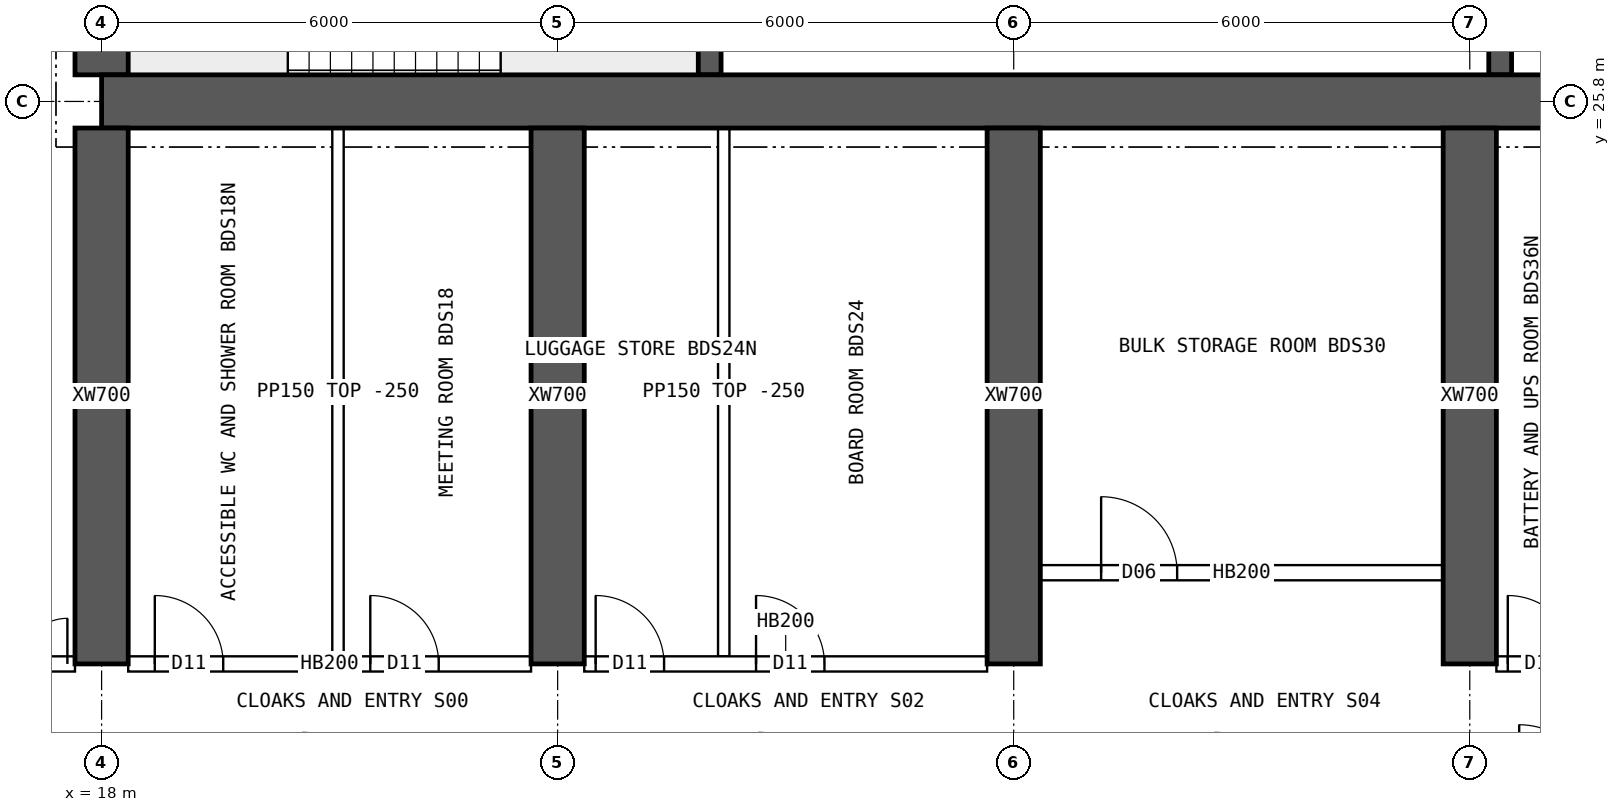
"""IFC4 building model, lengths in metres.
Left out: names, types, materials, properties, quantities, classifications, styles, units other than length and angle.
Written with IfcOpenShell. Run it as: python <this file> out.ifc"""

import sys

from ifc_helpers import new_model, si_unit, direction, frame, frame_2d, origin, place, context, subcontext, project, spatial, rectangle, extrude, element, fill, save


model = new_model("IFC4")
c1 = context("Model", 3, precision=1e-05, world=origin(), true_north=direction((0.0, 1.0)))
c2 = subcontext(c1, "Body", "Model", "MODEL_VIEW")
j1 = project(units=[si_unit("LENGTHUNIT", "METRE"), si_unit("PLANEANGLEUNIT", "RADIAN")], contexts=[c1])
p1 = place(None, origin())
s1 = spatial("IfcSite", under=j1, at=p1, CompositionType="ELEMENT")
p2 = place(p1, origin())
s2 = spatial("IfcBuilding", under=s1, at=p2, CompositionType="ELEMENT")
p3 = place(p2, frame((0.0, 0.0, 250.3)))
s3 = spatial("IfcBuildingStorey", under=s2, at=p3, CompositionType="ELEMENT", Elevation=250.3)
p4 = place(p3, frame((18.0, 25.8, 0.0), z_axis=(0.0, 0.0, 1.0), x_axis=(1.0, 0.0, 0.0)))
e1 = element("IfcWall", 1, at=p4, inside=s3, PredefinedType="SHEAR", context=c2, shape_type="SweptSolid", body=[
    extrude(rectangle(XDim=48.0, YDim=0.7, at=frame_2d((24.0, 0.0))), origin(), (0.0, 0.0, 1.0), 3.75),
])
p5 = place(p3, frame((18.0, 26.15, 0.0), z_axis=(0.0, 0.0, 1.0), x_axis=(0.0, 1.0, 0.0)))
e2 = element("IfcWall", 2, at=p5, inside=s3, PredefinedType="SHEAR", context=c2, shape_type="SweptSolid", body=[
    extrude(rectangle(XDim=11.7, YDim=0.7, at=frame_2d((5.85, 0.0))), origin(), (0.0, 0.0, 1.0), 3.75),
])
p6 = place(p5, frame((5.15, 0.0, 0.0)))
e3 = element("IfcOpeningElement", 3, at=p6, cuts=e2, PredefinedType="OPENING", context=c2, shape_type="SweptSolid", body=[
    extrude(rectangle(XDim=1.2, YDim=2.1, at=frame_2d((0.6, 1.05))), frame((0.0, 0.36, 0.0), z_axis=(0.0, -1.0, 0.0), x_axis=(1.0, 0.0, 0.0)), (0.0, 0.0, 1.0), 0.72),
])
for number, where, z_axis, x_axis in (
    (4, (26.0, 26.15, 0.0), (0.0, 0.0, 1.0), (0.0, 1.0, 0.0)),
    (5, (36.4, 26.15, 0.0), (0.0, 0.0, 1.0), (0.0, 1.0, 0.0)),
):
    element("IfcWall", number, at=place(p3, frame(where, z_axis=z_axis, x_axis=x_axis)), inside=s3, PredefinedType="SHEAR", context=c2, shape_type="SweptSolid", body=[
        extrude(rectangle(XDim=4.1, YDim=0.3, at=frame_2d((2.05, 0.0))), origin(), (0.0, 0.0, 1.0), 3.75),
    ])
for number, where, z_axis, x_axis in (
    (6, (18.0, 18.4, 0.0), (0.0, 0.0, 1.0), (0.0, 1.0, 0.0)),
    (7, (24.0, 18.4, 0.0), (0.0, 0.0, 1.0), (0.0, 1.0, 0.0)),
    (8, (30.0, 18.4, 0.0), (0.0, 0.0, 1.0), (0.0, 1.0, 0.0)),
    (9, (36.0, 18.4, 0.0), (0.0, 0.0, 1.0), (0.0, 1.0, 0.0)),
):
    element("IfcWall", number, at=place(p3, frame(where, z_axis=z_axis, x_axis=x_axis)), inside=s3, PredefinedType="SHEAR", context=c2, shape_type="SweptSolid", body=[
        extrude(rectangle(XDim=7.05, YDim=0.7, at=frame_2d((3.525, 0.0))), origin(), (0.0, 0.0, 1.0), 3.75),
    ])
p7 = place(p3, frame((15.6, 18.4, 0.0), z_axis=(0.0, 0.0, 1.0), x_axis=(1.0, 0.0, 0.0)))
e10 = element("IfcWall", 10, at=p7, inside=s3, PredefinedType="SOLIDWALL", context=c2, shape_type="SweptSolid", body=[
    extrude(rectangle(XDim=2.05, YDim=0.2, at=frame_2d((1.025, 0.0))), origin(), (0.0, 0.0, 1.0), 3.5),
])
p8 = place(p7, frame((0.75, 0.0, 0.0)))
e11 = element("IfcOpeningElement", 11, at=p8, cuts=e10, PredefinedType="OPENING", context=c2, shape_type="SweptSolid", body=[
    extrude(rectangle(XDim=1.2, YDim=2.1, at=frame_2d((0.6, 1.05))), frame((0.0, 0.11, 0.0), z_axis=(0.0, -1.0, 0.0), x_axis=(1.0, 0.0, 0.0)), (0.0, 0.0, 1.0), 0.22),
])
p9 = place(p3, frame((18.35, 18.4, 0.0), z_axis=(0.0, 0.0, 1.0), x_axis=(1.0, 0.0, 0.0)))
e12 = element("IfcWall", 12, at=p9, inside=s3, PredefinedType="SOLIDWALL", context=c2, shape_type="SweptSolid", body=[
    extrude(rectangle(XDim=5.3, YDim=0.2, at=frame_2d((2.65, 0.0))), origin(), (0.0, 0.0, 1.0), 3.5),
])
p10 = place(p9, frame((0.35, 0.0, 0.0)))
e13 = element("IfcOpeningElement", 13, at=p10, cuts=e12, PredefinedType="OPENING", context=c2, shape_type="SweptSolid", body=[
    extrude(rectangle(XDim=0.9, YDim=2.1, at=frame_2d((0.45, 1.05))), frame((0.0, 0.11, 0.0), z_axis=(0.0, -1.0, 0.0), x_axis=(1.0, 0.0, 0.0)), (0.0, 0.0, 1.0), 0.22),
])
p11 = place(p9, frame((3.185, 0.0, 0.0)))
e14 = element("IfcOpeningElement", 14, at=p11, cuts=e12, PredefinedType="OPENING", context=c2, shape_type="SweptSolid", body=[
    extrude(rectangle(XDim=0.9, YDim=2.1, at=frame_2d((0.45, 1.05))), frame((0.0, 0.11, 0.0), z_axis=(0.0, -1.0, 0.0), x_axis=(1.0, 0.0, 0.0)), (0.0, 0.0, 1.0), 0.22),
])
p12 = place(p3, frame((24.35, 18.4, 0.0), z_axis=(0.0, 0.0, 1.0), x_axis=(1.0, 0.0, 0.0)))
e15 = element("IfcWall", 15, at=p12, inside=s3, PredefinedType="SOLIDWALL", context=c2, shape_type="SweptSolid", body=[
    extrude(rectangle(XDim=5.3, YDim=0.2, at=frame_2d((2.65, 0.0))), origin(), (0.0, 0.0, 1.0), 3.5),
])
p13 = place(p12, frame((0.15, 0.0, 0.0)))
e16 = element("IfcOpeningElement", 16, at=p13, cuts=e15, PredefinedType="OPENING", context=c2, shape_type="SweptSolid", body=[
    extrude(rectangle(XDim=0.9, YDim=2.1, at=frame_2d((0.45, 1.05))), frame((0.0, 0.11, 0.0), z_axis=(0.0, -1.0, 0.0), x_axis=(1.0, 0.0, 0.0)), (0.0, 0.0, 1.0), 0.22),
])
p14 = place(p12, frame((2.26, 0.0, 0.0)))
e17 = element("IfcOpeningElement", 17, at=p14, cuts=e15, PredefinedType="OPENING", context=c2, shape_type="SweptSolid", body=[
    extrude(rectangle(XDim=0.9, YDim=2.1, at=frame_2d((0.45, 1.05))), frame((0.0, 0.11, 0.0), z_axis=(0.0, -1.0, 0.0), x_axis=(1.0, 0.0, 0.0)), (0.0, 0.0, 1.0), 0.22),
])
p15 = place(p3, frame((36.35, 18.4, 0.0), z_axis=(0.0, 0.0, 1.0), x_axis=(1.0, 0.0, 0.0)))
e18 = element("IfcWall", 18, at=p15, inside=s3, PredefinedType="SOLIDWALL", context=c2, shape_type="SweptSolid", body=[
    extrude(rectangle(XDim=5.3, YDim=0.2, at=frame_2d((2.65, 0.0))), origin(), (0.0, 0.0, 1.0), 3.5),
])
p16 = place(p15, frame((0.15, 0.0, 0.0)))
e19 = element("IfcOpeningElement", 19, at=p16, cuts=e18, PredefinedType="OPENING", context=c2, shape_type="SweptSolid", body=[
    extrude(rectangle(XDim=0.9, YDim=2.1, at=frame_2d((0.45, 1.05))), frame((0.0, 0.11, 0.0), z_axis=(0.0, -1.0, 0.0), x_axis=(1.0, 0.0, 0.0)), (0.0, 0.0, 1.0), 0.22),
])
p17 = place(p15, frame((2.34, 0.0, 0.0)))
e20 = element("IfcOpeningElement", 20, at=p17, cuts=e18, PredefinedType="OPENING", context=c2, shape_type="SweptSolid", body=[
    extrude(rectangle(XDim=0.9, YDim=2.1, at=frame_2d((0.45, 1.05))), frame((0.0, 0.11, 0.0), z_axis=(0.0, -1.0, 0.0), x_axis=(1.0, 0.0, 0.0)), (0.0, 0.0, 1.0), 0.22),
])
for number, where, z_axis, x_axis in (
    (21, (21.11, 18.5, 0.0), (0.0, 0.0, 1.0), (0.0, 1.0, 0.0)),
    (22, (26.185, 18.5, 0.0), (0.0, 0.0, 1.0), (0.0, 1.0, 0.0)),
):
    element("IfcWall", number, at=place(p3, frame(where, z_axis=z_axis, x_axis=x_axis)), inside=s3, PredefinedType="PARTITIONING", context=c2, shape_type="SweptSolid", body=[
        extrude(rectangle(XDim=6.95, YDim=0.15, at=frame_2d((3.475, 0.0))), origin(), (0.0, 0.0, 1.0), 3.5),
    ])
p18 = place(p3, frame((30.35, 19.6, 0.0), z_axis=(0.0, 0.0, 1.0), x_axis=(1.0, 0.0, 0.0)))
e23 = element("IfcWall", 23, at=p18, inside=s3, PredefinedType="SOLIDWALL", context=c2, shape_type="SweptSolid", body=[
    extrude(rectangle(XDim=5.3, YDim=0.2, at=frame_2d((2.65, 0.0))), origin(), (0.0, 0.0, 1.0), 3.5),
])
p19 = place(p18, frame((0.8, 0.0, 0.0)))
e24 = element("IfcOpeningElement", 24, at=p19, cuts=e23, PredefinedType="OPENING", context=c2, shape_type="SweptSolid", body=[
    extrude(rectangle(XDim=1.0, YDim=2.1, at=frame_2d((0.5, 1.05))), frame((0.0, 0.11, 0.0), z_axis=(0.0, -1.0, 0.0), x_axis=(1.0, 0.0, 0.0)), (0.0, 0.0, 1.0), 0.22),
])
p20 = place(p8, origin())
e25 = element("IfcDoor", 25, at=p20, inside=s3, OperationType="DOUBLE_DOOR_SINGLE_SWING", PredefinedType="DOOR", context=c2, shape_type="SweptSolid", body=[
    extrude(rectangle(XDim=1.2, YDim=2.1, at=frame_2d((0.6, 1.05))), frame((0.0, 0.025, 0.0), z_axis=(0.0, -1.0, 0.0), x_axis=(1.0, 0.0, 0.0)), (0.0, 0.0, 1.0), 0.05),
])
fill(e11, e25)
p21 = place(p10, origin())
e26 = element("IfcDoor", 26, at=p21, inside=s3, OperationType="SINGLE_SWING_LEFT", PredefinedType="DOOR", context=c2, shape_type="SweptSolid", body=[
    extrude(rectangle(XDim=0.9, YDim=2.1, at=frame_2d((0.45, 1.05))), frame((0.0, 0.025, 0.0), z_axis=(0.0, -1.0, 0.0), x_axis=(1.0, 0.0, 0.0)), (0.0, 0.0, 1.0), 0.05),
])
fill(e13, e26)
p22 = place(p11, origin())
e27 = element("IfcDoor", 27, at=p22, inside=s3, OperationType="SINGLE_SWING_LEFT", PredefinedType="DOOR", context=c2, shape_type="SweptSolid", body=[
    extrude(rectangle(XDim=0.9, YDim=2.1, at=frame_2d((0.45, 1.05))), frame((0.0, 0.025, 0.0), z_axis=(0.0, -1.0, 0.0), x_axis=(1.0, 0.0, 0.0)), (0.0, 0.0, 1.0), 0.05),
])
fill(e14, e27)
p23 = place(p13, origin())
e28 = element("IfcDoor", 28, at=p23, inside=s3, OperationType="SINGLE_SWING_LEFT", PredefinedType="DOOR", context=c2, shape_type="SweptSolid", body=[
    extrude(rectangle(XDim=0.9, YDim=2.1, at=frame_2d((0.45, 1.05))), frame((0.0, 0.025, 0.0), z_axis=(0.0, -1.0, 0.0), x_axis=(1.0, 0.0, 0.0)), (0.0, 0.0, 1.0), 0.05),
])
fill(e16, e28)
p24 = place(p14, origin())
e29 = element("IfcDoor", 29, at=p24, inside=s3, OperationType="SINGLE_SWING_LEFT", PredefinedType="DOOR", context=c2, shape_type="SweptSolid", body=[
    extrude(rectangle(XDim=0.9, YDim=2.1, at=frame_2d((0.45, 1.05))), frame((0.0, 0.025, 0.0), z_axis=(0.0, -1.0, 0.0), x_axis=(1.0, 0.0, 0.0)), (0.0, 0.0, 1.0), 0.05),
])
fill(e17, e29)
p25 = place(p19, origin())
e30 = element("IfcDoor", 30, at=p25, inside=s3, OperationType="SINGLE_SWING_LEFT", PredefinedType="DOOR", context=c2, shape_type="SweptSolid", body=[
    extrude(rectangle(XDim=1.0, YDim=2.1, at=frame_2d((0.5, 1.05))), frame((0.0, 0.025, 0.0), z_axis=(0.0, -1.0, 0.0), x_axis=(1.0, 0.0, 0.0)), (0.0, 0.0, 1.0), 0.05),
])
fill(e24, e30)
p26 = place(p16, origin())
e31 = element("IfcDoor", 31, at=p26, inside=s3, OperationType="SINGLE_SWING_LEFT", PredefinedType="DOOR", context=c2, shape_type="SweptSolid", body=[
    extrude(rectangle(XDim=0.9, YDim=2.1, at=frame_2d((0.45, 1.05))), frame((0.0, 0.025, 0.0), z_axis=(0.0, -1.0, 0.0), x_axis=(1.0, 0.0, 0.0)), (0.0, 0.0, 1.0), 0.05),
])
fill(e19, e31)
save(model, sys.argv[1])
